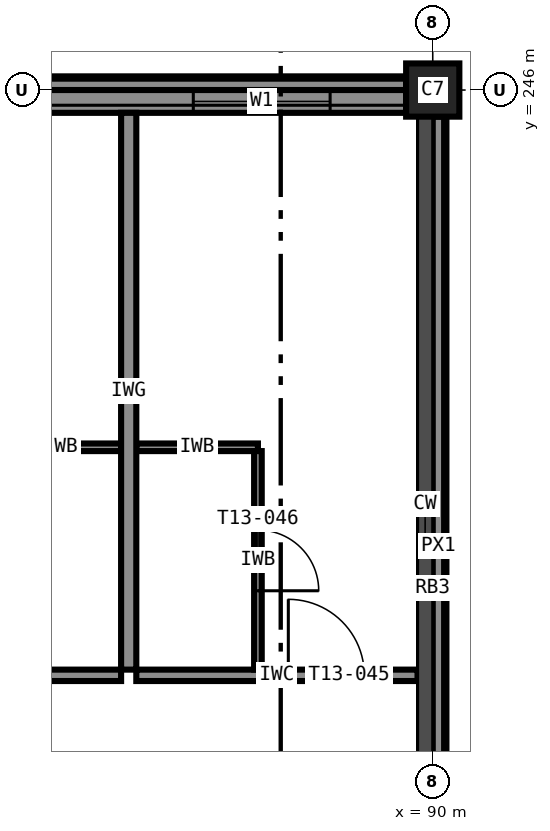
"""IFC4 building model, lengths in metres.
Left out: names, types, materials, properties, quantities, classifications, styles, units other than length and angle.
Written with IfcOpenShell. Run it as: python <this file> out.ifc"""

import sys

from ifc_helpers import new_model, si_unit, direction, frame, frame_2d, origin, origin_2d, place, context, subcontext, project, spatial, rectangle, extrude, element, fill, save


model = new_model("IFC4")
c1 = context("Model", 3, precision=1e-05, world=origin(), true_north=direction((0.0, 1.0)))
c2 = subcontext(c1, "Body", "Model", "MODEL_VIEW")
j1 = project(units=[si_unit("LENGTHUNIT", "METRE"), si_unit("PLANEANGLEUNIT", "RADIAN")], contexts=[c1])
p1 = place(None, origin())
s1 = spatial("IfcSite", under=j1, at=p1, CompositionType="ELEMENT")
p2 = place(p1, origin())
s2 = spatial("IfcBuilding", under=s1, at=p2, CompositionType="ELEMENT")
p3 = place(p2, frame((0.0, 0.0, 53.4)))
s3 = spatial("IfcBuildingStorey", under=s2, at=p3, CompositionType="ELEMENT", Elevation=53.4)
p4 = place(p3, frame((90.0, 246.0, 0.0), z_axis=(0.0, 0.0, 1.0), x_axis=(1.0, 0.0, 0.0)))
e1 = element("IfcColumn", 1, at=p4, inside=s3, PredefinedType="COLUMN", context=c2, shape_type="SweptSolid", body=[
    extrude(rectangle(XDim=0.7, YDim=0.7, at=origin_2d()), origin(), (0.0, 0.0, 1.0), 3.6),
])
p5 = place(p3, frame((90.075, 234.35, 3.4), z_axis=(0.0, 0.0, 1.0), x_axis=(0.0, 1.0, 0.0)))
e2 = element("IfcWall", 2, at=p5, inside=s3, PredefinedType="STANDARD", context=c2, shape_type="SweptSolid", body=[
    extrude(rectangle(XDim=11.3, YDim=0.15, at=frame_2d((5.65, 0.0))), origin(), (0.0, 0.0, 1.0), 0.2),
])
p6 = place(p3, frame((89.65, 245.85, 0.0), z_axis=(0.0, 0.0, 1.0), x_axis=(-1.0, 0.0, 0.0)))
e3 = element("IfcWall", 3, at=p6, inside=s3, PredefinedType="STANDARD", context=c2, shape_type="SweptSolid", body=[
    extrude(rectangle(XDim=11.3, YDim=0.3, at=frame_2d((5.65, 0.0))), origin(), (0.0, 0.0, 1.0), 2.6),
])
p7 = place(p6, frame((8.575, 0.0, 0.85)))
e4 = element("IfcOpeningElement", 4, at=p7, cuts=e3, PredefinedType="OPENING", context=c2, shape_type="SweptSolid", body=[
    extrude(rectangle(XDim=1.8, YDim=1.75, at=frame_2d((0.9, 0.875))), frame((0.0, 0.16, 0.0), z_axis=(0.0, -1.0, 0.0), x_axis=(1.0, 0.0, 0.0)), (0.0, 0.0, 1.0), 0.32),
])
p8 = place(p6, frame((4.75, 0.0, 0.85)))
e5 = element("IfcOpeningElement", 5, at=p8, cuts=e3, PredefinedType="OPENING", context=c2, shape_type="SweptSolid", body=[
    extrude(rectangle(XDim=1.8, YDim=1.75, at=frame_2d((0.9, 0.875))), frame((0.0, 0.16, 0.0), z_axis=(0.0, -1.0, 0.0), x_axis=(1.0, 0.0, 0.0)), (0.0, 0.0, 1.0), 0.32),
])
p9 = place(p6, frame((1.0, 0.0, 0.85)))
e6 = element("IfcOpeningElement", 6, at=p9, cuts=e3, PredefinedType="OPENING", context=c2, shape_type="SweptSolid", body=[
    extrude(rectangle(XDim=1.8, YDim=1.75, at=frame_2d((0.9, 0.875))), frame((0.0, 0.16, 0.0), z_axis=(0.0, -1.0, 0.0), x_axis=(1.0, 0.0, 0.0)), (0.0, 0.0, 1.0), 0.32),
])
p10 = place(p3, frame((89.65, 246.075, 3.4), z_axis=(0.0, 0.0, 1.0), x_axis=(-1.0, 0.0, 0.0)))
e7 = element("IfcWall", 7, at=p10, inside=s3, PredefinedType="STANDARD", context=c2, shape_type="SweptSolid", body=[
    extrude(rectangle(XDim=11.3, YDim=0.15, at=frame_2d((5.65, 0.0))), origin(), (0.0, 0.0, 1.0), 0.2),
])
p11 = place(p3, frame((82.1, 238.3, 0.0), z_axis=(0.0, 0.0, 1.0), x_axis=(1.0, 0.0, 0.0)))
e8 = element("IfcWall", 8, at=p11, inside=s3, PredefinedType="PARTITIONING", context=c2, shape_type="SweptSolid", body=[
    extrude(rectangle(XDim=3.8, YDim=0.15, at=frame_2d((1.9, 0.0))), origin(), (0.0, 0.0, 1.0), 3.4),
])
p12 = place(p11, frame((0.55, 0.0, 0.0)))
e9 = element("IfcOpeningElement", 9, at=p12, cuts=e8, PredefinedType="OPENING", context=c2, shape_type="SweptSolid", body=[
    extrude(rectangle(XDim=1.0, YDim=2.1, at=frame_2d((0.5, 1.05))), frame((0.0, 0.085, 0.0), z_axis=(0.0, -1.0, 0.0), x_axis=(1.0, 0.0, 0.0)), (0.0, 0.0, 1.0), 0.17),
])
p13 = place(p3, frame((84.3, 241.3, 0.0), z_axis=(0.0, 0.0, 1.0), x_axis=(1.0, 0.0, 0.0)))
e10 = element("IfcWall", 10, at=p13, inside=s3, PredefinedType="PARTITIONING", context=c2, shape_type="SweptSolid", body=[
    extrude(rectangle(XDim=1.6, YDim=0.1, at=frame_2d((0.8, 0.0))), origin(), (0.0, 0.0, 1.0), 3.4),
])
p14 = place(p3, frame((86.1, 238.3, 0.0), z_axis=(0.0, 0.0, 1.0), x_axis=(1.0, 0.0, 0.0)))
e11 = element("IfcWall", 11, at=p14, inside=s3, PredefinedType="PARTITIONING", context=c2, shape_type="SweptSolid", body=[
    extrude(rectangle(XDim=3.7, YDim=0.15, at=frame_2d((1.85, 0.0))), origin(), (0.0, 0.0, 1.0), 3.4),
])
p15 = place(p14, frame((2.0, 0.0, 0.0)))
e12 = element("IfcOpeningElement", 12, at=p15, cuts=e11, PredefinedType="OPENING", context=c2, shape_type="SweptSolid", body=[
    extrude(rectangle(XDim=1.0, YDim=2.1, at=frame_2d((0.5, 1.05))), frame((0.0, 0.085, 0.0), z_axis=(0.0, -1.0, 0.0), x_axis=(1.0, 0.0, 0.0)), (0.0, 0.0, 1.0), 0.17),
])
p16 = place(p3, frame((86.1, 241.3, 0.0), z_axis=(0.0, 0.0, 1.0), x_axis=(1.0, 0.0, 0.0)))
e13 = element("IfcWall", 13, at=p16, inside=s3, PredefinedType="PARTITIONING", context=c2, shape_type="SweptSolid", body=[
    extrude(rectangle(XDim=1.6, YDim=0.1, at=frame_2d((0.8, 0.0))), origin(), (0.0, 0.0, 1.0), 3.4),
])
p17 = place(p3, frame((87.7, 241.25, 0.0), z_axis=(0.0, 0.0, 1.0), x_axis=(0.0, -1.0, 0.0)))
e14 = element("IfcWall", 14, at=p17, inside=s3, PredefinedType="PARTITIONING", context=c2, shape_type="SweptSolid", body=[
    extrude(rectangle(XDim=2.875, YDim=0.1, at=frame_2d((1.438, 0.0))), origin(), (0.0, 0.0, 1.0), 3.4),
])
p18 = place(p17, frame((1.038, 0.0, 0.0)))
e15 = element("IfcOpeningElement", 15, at=p18, cuts=e14, PredefinedType="OPENING", context=c2, shape_type="SweptSolid", body=[
    extrude(rectangle(XDim=0.8, YDim=2.1, at=frame_2d((0.4, 1.05))), frame((0.0, 0.06, 0.0), z_axis=(0.0, -1.0, 0.0), x_axis=(1.0, 0.0, 0.0)), (0.0, 0.0, 1.0), 0.12),
])
p19 = place(p3, frame((86.0, 245.7, 0.0), z_axis=(0.0, 0.0, 1.0), x_axis=(0.0, -1.0, 0.0)))
e16 = element("IfcWall", 16, at=p19, inside=s3, PredefinedType="PARTITIONING", context=c2, shape_type="SweptSolid", body=[
    extrude(rectangle(XDim=7.325, YDim=0.2, at=frame_2d((3.663, 0.0))), origin(), (0.0, 0.0, 1.0), 3.4),
])
p20 = place(p9, origin())
e17 = element("IfcWindow", 17, at=p20, inside=s3, PartitioningType="SINGLE_PANEL", PredefinedType="WINDOW", context=c2, shape_type="SweptSolid", body=[
    extrude(rectangle(XDim=1.8, YDim=1.75, at=frame_2d((0.9, 0.875))), frame((0.0, 0.03, 0.0), z_axis=(0.0, -1.0, 0.0), x_axis=(1.0, 0.0, 0.0)), (0.0, 0.0, 1.0), 0.06),
])
fill(e6, e17)
p21 = place(p15, origin())
e18 = element("IfcDoor", 18, at=p21, inside=s3, OperationType="SINGLE_SWING_LEFT", PredefinedType="DOOR", context=c2, shape_type="SweptSolid", body=[
    extrude(rectangle(XDim=1.0, YDim=2.1, at=frame_2d((0.5, 1.05))), frame((0.0, 0.025, 0.0), z_axis=(0.0, -1.0, 0.0), x_axis=(1.0, 0.0, 0.0)), (0.0, 0.0, 1.0), 0.05),
])
fill(e12, e18)
p22 = place(p18, origin())
e19 = element("IfcDoor", 19, at=p22, inside=s3, OperationType="SINGLE_SWING_RIGHT", PredefinedType="DOOR", context=c2, shape_type="SweptSolid", body=[
    extrude(rectangle(XDim=0.8, YDim=2.1, at=frame_2d((0.4, 1.05))), frame((0.0, 0.025, 0.0), z_axis=(0.0, -1.0, 0.0), x_axis=(1.0, 0.0, 0.0)), (0.0, 0.0, 1.0), 0.05),
])
fill(e15, e19)
save(model, sys.argv[1])
